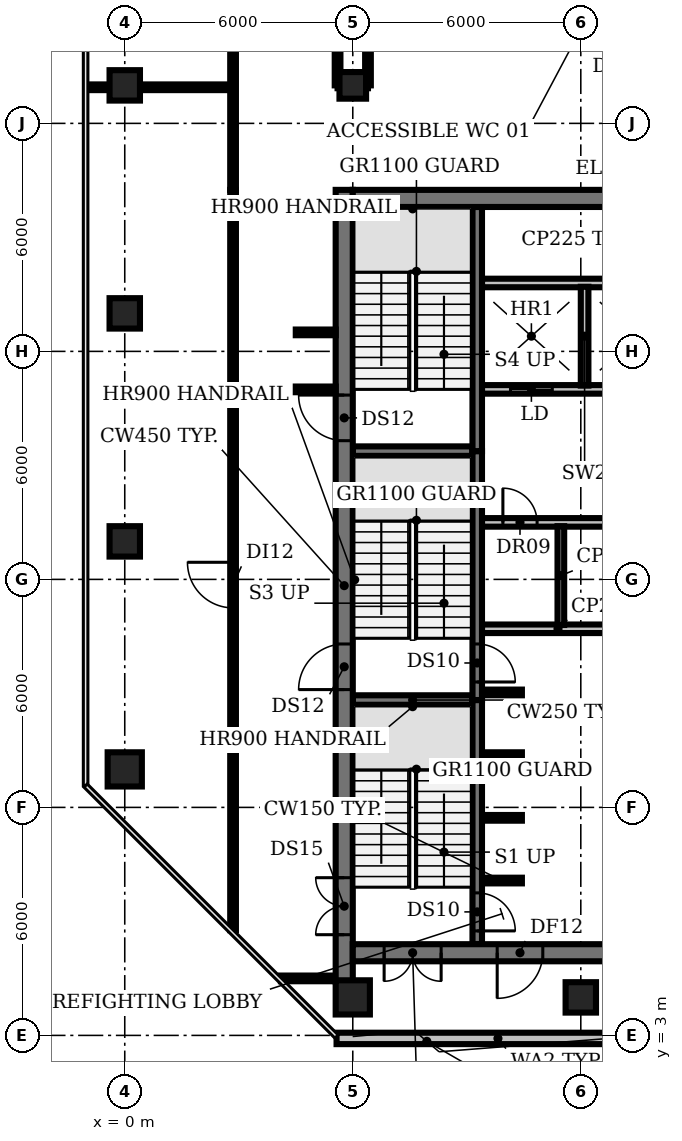
"""IFC4 building model, lengths in metres.
Left out: names, types, materials, properties, quantities, classifications, styles, units other than length and angle.
Written with IfcOpenShell. Run it as: python <this file> out.ifc"""

import sys

from ifc_helpers import new_model, si_unit, direction, frame, frame_2d, origin, origin_2d, place, context, subcontext, project, spatial, rectangle, circle, extrude, element, fill, save


model = new_model("IFC4")
c1 = context("Model", 3, precision=1e-05, world=origin(), true_north=direction((0.0, 1.0)))
c2 = subcontext(c1, "Body", "Model", "MODEL_VIEW")
j1 = project(units=[si_unit("LENGTHUNIT", "METRE"), si_unit("PLANEANGLEUNIT", "RADIAN")], contexts=[c1])
p1 = place(None, origin())
s1 = spatial("IfcSite", under=j1, at=p1, CompositionType="ELEMENT")
p2 = place(p1, origin())
s2 = spatial("IfcBuilding", under=s1, at=p2, CompositionType="ELEMENT")
p3 = place(p2, frame((0.0, 0.0, 209.6)))
s3 = spatial("IfcBuildingStorey", under=s2, at=p3, CompositionType="ELEMENT", Elevation=209.6)
p4 = place(p3, frame((0.0, 10.0, 0.0), z_axis=(0.0, 0.0, 1.0), x_axis=(1.0, 0.0, 0.0)))
e1 = element("IfcColumn", 1, at=p4, inside=s3, PredefinedType="COLUMN", context=c2, shape_type="SweptSolid", body=[
    extrude(circle(Radius=0.45, at=origin_2d()), origin(), (0.0, 0.0, 1.0), 3.8),
])
for number, where, z_axis, x_axis in (
    (2, (0.0, 16.0, 0.0), (0.0, 0.0, 1.0), (1.0, 0.0, 0.0)),
    (3, (0.0, 22.0, 0.0), (0.0, 0.0, 1.0), (1.0, 0.0, 0.0)),
    (4, (0.0, 28.0, 0.0), (0.0, 0.0, 1.0), (1.0, 0.0, 0.0)),
):
    element("IfcColumn", number, at=place(p3, frame(where, z_axis=z_axis, x_axis=x_axis)), inside=s3, PredefinedType="COLUMN", context=c2, shape_type="SweptSolid", body=[
        extrude(rectangle(XDim=0.8, YDim=0.8, at=origin_2d()), origin(), (0.0, 0.0, 1.0), 3.8),
    ])
p5 = place(p3, frame((6.0, 4.0, 0.0), z_axis=(0.0, 0.0, 1.0), x_axis=(1.0, 0.0, 0.0)))
e5 = element("IfcColumn", 5, at=p5, inside=s3, PredefinedType="COLUMN", context=c2, shape_type="SweptSolid", body=[
    extrude(circle(Radius=0.45, at=origin_2d()), origin(), (0.0, 0.0, 1.0), 3.8),
])
p6 = place(p3, frame((6.0, 28.0, 0.0), z_axis=(0.0, 0.0, 1.0), x_axis=(1.0, 0.0, 0.0)))
e6 = element("IfcColumn", 6, at=p6, inside=s3, PredefinedType="COLUMN", context=c2, shape_type="SweptSolid", body=[
    extrude(rectangle(XDim=0.7, YDim=0.7, at=origin_2d()), origin(), (0.0, 0.0, 1.0), 3.8),
])
p7 = place(p3, frame((12.0, 4.0, 0.0), z_axis=(0.0, 0.0, 1.0), x_axis=(1.0, 0.0, 0.0)))
e7 = element("IfcColumn", 7, at=p7, inside=s3, PredefinedType="COLUMN", context=c2, shape_type="SweptSolid", body=[
    extrude(rectangle(XDim=0.8, YDim=0.8, at=origin_2d()), origin(), (0.0, 0.0, 1.0), 3.8),
])
p8 = place(p3, frame((5.573, 2.92, 0.0), z_axis=(0.0, 0.0, 1.0), x_axis=(1.0, 0.0, 0.0)))
e8 = element("IfcWall", 8, at=p8, inside=s3, PredefinedType="SOLIDWALL", context=c2, shape_type="SweptSolid", body=[
    extrude(rectangle(XDim=8.492, YDim=0.3, at=frame_2d((4.246, 0.0))), origin(), (0.0, 0.0, 1.0), 3.8),
])
for number, where, z_axis, x_axis in (
    (9, (9.4, 7.075, 0.0), (0.0, 0.0, 1.0), (1.0, 0.0, 0.0)),
    (10, (9.4, 8.725, 0.0), (0.0, 0.0, 1.0), (1.0, 0.0, 0.0)),
    (11, (9.4, 10.375, 0.0), (0.0, 0.0, 1.0), (1.0, 0.0, 0.0)),
):
    element("IfcWall", number, at=place(p3, frame(where, z_axis=z_axis, x_axis=x_axis)), inside=s3, PredefinedType="SHEAR", context=c2, shape_type="SweptSolid", body=[
        extrude(rectangle(XDim=1.05, YDim=0.15, at=frame_2d((0.525, 0.0))), origin(), (0.0, 0.0, 1.0), 3.8),
    ])
p9 = place(p3, frame((6.0, 11.825, 0.0), z_axis=(0.0, 0.0, 1.0), x_axis=(1.0, 0.0, 0.0)))
e12 = element("IfcWall", 12, at=p9, inside=s3, PredefinedType="SHEAR", context=c2, shape_type="SweptSolid", body=[
    extrude(rectangle(XDim=3.15, YDim=0.25, at=frame_2d((1.575, 0.0))), origin(), (0.0, 0.0, 1.0), 3.8),
])
p10 = place(p3, frame((9.4, 12.025, 0.0), z_axis=(0.0, 0.0, 1.0), x_axis=(1.0, 0.0, 0.0)))
e13 = element("IfcWall", 13, at=p10, inside=s3, PredefinedType="SHEAR", context=c2, shape_type="SweptSolid", body=[
    extrude(rectangle(XDim=1.05, YDim=0.15, at=frame_2d((0.525, 0.0))), origin(), (0.0, 0.0, 1.0), 3.8),
])
p11 = place(p3, frame((9.4, 13.7, 0.0), z_axis=(0.0, 0.0, 1.0), x_axis=(1.0, 0.0, 0.0)))
e14 = element("IfcWall", 14, at=p11, inside=s3, PredefinedType="PARTITIONING", context=c2, shape_type="SweptSolid", body=[
    extrude(rectangle(XDim=4.0, YDim=0.225, at=frame_2d((2.0, 0.0))), origin(), (0.0, 0.0, 1.0), 3.8),
])
p12 = place(p3, frame((9.4, 16.5, 0.0), z_axis=(0.0, 0.0, 1.0), x_axis=(1.0, 0.0, 0.0)))
e15 = element("IfcWall", 15, at=p12, inside=s3, PredefinedType="PARTITIONING", context=c2, shape_type="SweptSolid", body=[
    extrude(rectangle(XDim=14.6, YDim=0.225, at=frame_2d((7.3, 0.0))), origin(), (0.0, 0.0, 1.0), 3.8),
])
p13 = place(p12, frame((0.55, 0.0, 0.0)))
e16 = element("IfcOpeningElement", 16, at=p13, cuts=e15, PredefinedType="OPENING", context=c2, shape_type="SweptSolid", body=[
    extrude(rectangle(XDim=0.9, YDim=2.1, at=frame_2d((0.45, 1.05))), frame((0.0, 0.123, 0.0), z_axis=(0.0, -1.0, 0.0), x_axis=(1.0, 0.0, 0.0)), (0.0, 0.0, 1.0), 0.245),
])
p14 = place(p12, frame((6.075, 0.0, 0.0)))
e17 = element("IfcOpeningElement", 17, at=p14, cuts=e15, PredefinedType="OPENING", context=c2, shape_type="SweptSolid", body=[
    extrude(rectangle(XDim=1.0, YDim=2.1, at=frame_2d((0.5, 1.05))), frame((0.0, 0.123, 0.0), z_axis=(0.0, -1.0, 0.0), x_axis=(1.0, 0.0, 0.0)), (0.0, 0.0, 1.0), 0.245),
])
p15 = place(p12, frame((11.647, 0.0, 0.0)))
e18 = element("IfcOpeningElement", 18, at=p15, cuts=e15, PredefinedType="OPENING", context=c2, shape_type="SweptSolid", body=[
    extrude(rectangle(XDim=0.9, YDim=2.1, at=frame_2d((0.45, 1.05))), frame((0.0, 0.123, 0.0), z_axis=(0.0, -1.0, 0.0), x_axis=(1.0, 0.0, 0.0)), (0.0, 0.0, 1.0), 0.245),
])
p16 = place(p12, frame((13.423, 0.0, 0.0)))
e19 = element("IfcOpeningElement", 19, at=p16, cuts=e15, PredefinedType="OPENING", context=c2, shape_type="SweptSolid", body=[
    extrude(rectangle(XDim=0.9, YDim=2.1, at=frame_2d((0.45, 1.05))), frame((0.0, 0.123, 0.0), z_axis=(0.0, -1.0, 0.0), x_axis=(1.0, 0.0, 0.0)), (0.0, 0.0, 1.0), 0.245),
])
p17 = place(p3, frame((6.0, 18.375, 0.0), z_axis=(0.0, 0.0, 1.0), x_axis=(1.0, 0.0, 0.0)))
e20 = element("IfcWall", 20, at=p17, inside=s3, PredefinedType="SHEAR", context=c2, shape_type="SweptSolid", body=[
    extrude(rectangle(XDim=3.15, YDim=0.25, at=frame_2d((1.575, 0.0))), origin(), (0.0, 0.0, 1.0), 3.8),
])
p18 = place(p3, frame((24.0, 20.0, 0.0), z_axis=(0.0, 0.0, 1.0), x_axis=(-1.0, 0.0, 0.0)))
e21 = element("IfcWall", 21, at=p18, inside=s3, PredefinedType="PARTITIONING", context=c2, shape_type="SweptSolid", body=[
    extrude(rectangle(XDim=14.6, YDim=0.225, at=frame_2d((7.3, 0.0))), origin(), (0.0, 0.0, 1.0), 3.8),
])
p19 = place(p18, frame((12.75, 0.0, 0.0)))
e22 = element("IfcOpeningElement", 22, at=p19, cuts=e21, PredefinedType="OPENING", context=c2, shape_type="SweptSolid", body=[
    extrude(rectangle(XDim=1.1, YDim=2.1, at=frame_2d((0.55, 1.05))), frame((0.0, 0.123, 0.0), z_axis=(0.0, -1.0, 0.0), x_axis=(1.0, 0.0, 0.0)), (0.0, 0.0, 1.0), 0.245),
])
p20 = place(p18, frame((9.95, 0.0, 0.0)))
e23 = element("IfcOpeningElement", 23, at=p20, cuts=e21, PredefinedType="OPENING", context=c2, shape_type="SweptSolid", body=[
    extrude(rectangle(XDim=1.1, YDim=2.1, at=frame_2d((0.55, 1.05))), frame((0.0, 0.123, 0.0), z_axis=(0.0, -1.0, 0.0), x_axis=(1.0, 0.0, 0.0)), (0.0, 0.0, 1.0), 0.245),
])
p21 = place(p18, frame((7.15, 0.0, 0.0)))
e24 = element("IfcOpeningElement", 24, at=p21, cuts=e21, PredefinedType="OPENING", context=c2, shape_type="SweptSolid", body=[
    extrude(rectangle(XDim=1.1, YDim=2.1, at=frame_2d((0.55, 1.05))), frame((0.0, 0.123, 0.0), z_axis=(0.0, -1.0, 0.0), x_axis=(1.0, 0.0, 0.0)), (0.0, 0.0, 1.0), 0.245),
])
p22 = place(p18, frame((4.35, 0.0, 0.0)))
e25 = element("IfcOpeningElement", 25, at=p22, cuts=e21, PredefinedType="OPENING", context=c2, shape_type="SweptSolid", body=[
    extrude(rectangle(XDim=1.1, YDim=2.1, at=frame_2d((0.55, 1.05))), frame((0.0, 0.123, 0.0), z_axis=(0.0, -1.0, 0.0), x_axis=(1.0, 0.0, 0.0)), (0.0, 0.0, 1.0), 0.245),
])
p23 = place(p18, frame((2.137, 0.0, 0.0)))
e26 = element("IfcOpeningElement", 26, at=p23, cuts=e21, PredefinedType="OPENING", context=c2, shape_type="SweptSolid", body=[
    extrude(rectangle(XDim=0.9, YDim=2.1, at=frame_2d((0.45, 1.05))), frame((0.0, 0.123, 0.0), z_axis=(0.0, -1.0, 0.0), x_axis=(1.0, 0.0, 0.0)), (0.0, 0.0, 1.0), 0.245),
])
p24 = place(p18, frame((0.363, 0.0, 0.0)))
e27 = element("IfcOpeningElement", 27, at=p24, cuts=e21, PredefinedType="OPENING", context=c2, shape_type="SweptSolid", body=[
    extrude(rectangle(XDim=0.9, YDim=2.1, at=frame_2d((0.45, 1.05))), frame((0.0, 0.123, 0.0), z_axis=(0.0, -1.0, 0.0), x_axis=(1.0, 0.0, 0.0)), (0.0, 0.0, 1.0), 0.245),
])
p25 = place(p3, frame((9.4, 22.8, 0.0), z_axis=(0.0, 0.0, 1.0), x_axis=(1.0, 0.0, 0.0)))
e28 = element("IfcWall", 28, at=p25, inside=s3, PredefinedType="PARTITIONING", context=c2, shape_type="SweptSolid", body=[
    extrude(rectangle(XDim=14.6, YDim=0.225, at=frame_2d((7.3, 0.0))), origin(), (0.0, 0.0, 1.0), 3.8),
])
p26 = place(p3, frame((9.275, 11.825, 0.0), z_axis=(0.0, 0.0, 1.0), x_axis=(0.0, -1.0, 0.0)))
e29 = element("IfcWall", 29, at=p26, inside=s3, PredefinedType="SHEAR", context=c2, shape_type="SweptSolid", body=[
    extrude(rectangle(XDim=6.425, YDim=0.25, at=frame_2d((3.212, 0.0))), origin(), (0.0, 0.0, 1.0), 3.8),
])
p27 = place(p26, frame((5.075, 0.0, 0.0)))
e30 = element("IfcOpeningElement", 30, at=p27, cuts=e29, PredefinedType="OPENING", context=c2, shape_type="SweptSolid", body=[
    extrude(rectangle(XDim=1.0, YDim=2.1, at=frame_2d((0.5, 1.05))), frame((0.0, 0.135, 0.0), z_axis=(0.0, -1.0, 0.0), x_axis=(1.0, 0.0, 0.0)), (0.0, 0.0, 1.0), 0.27),
])
p28 = place(p3, frame((9.275, 18.375, 0.0), z_axis=(0.0, 0.0, 1.0), x_axis=(0.0, -1.0, 0.0)))
e31 = element("IfcWall", 31, at=p28, inside=s3, PredefinedType="SHEAR", context=c2, shape_type="SweptSolid", body=[
    extrude(rectangle(XDim=6.55, YDim=0.25, at=frame_2d((3.275, 0.0))), origin(), (0.0, 0.0, 1.0), 3.8),
])
p29 = place(p28, frame((5.075, 0.0, 0.0)))
e32 = element("IfcOpeningElement", 32, at=p29, cuts=e31, PredefinedType="OPENING", context=c2, shape_type="SweptSolid", body=[
    extrude(rectangle(XDim=1.0, YDim=2.1, at=frame_2d((0.5, 1.05))), frame((0.0, 0.135, 0.0), z_axis=(0.0, -1.0, 0.0), x_axis=(1.0, 0.0, 0.0)), (0.0, 0.0, 1.0), 0.27),
])
p30 = place(p3, frame((9.275, 18.375, 0.0), z_axis=(0.0, 0.0, 1.0), x_axis=(0.0, 1.0, 0.0)))
e33 = element("IfcWall", 33, at=p30, inside=s3, PredefinedType="SHEAR", context=c2, shape_type="SweptSolid", body=[
    extrude(rectangle(XDim=6.425, YDim=0.25, at=frame_2d((3.212, 0.0))), origin(), (0.0, 0.0, 1.0), 3.8),
])
p31 = place(p3, frame((11.475, 13.8, 0.0), z_axis=(0.0, 0.0, 1.0), x_axis=(0.0, 1.0, 0.0)))
e34 = element("IfcWall", 34, at=p31, inside=s3, PredefinedType="PARTITIONING", context=c2, shape_type="SweptSolid", body=[
    extrude(rectangle(XDim=2.6, YDim=0.175, at=frame_2d((1.3, 0.0))), origin(), (0.0, 0.0, 1.0), 3.8),
])
p32 = place(p3, frame((12.1, 20.1, 0.0), z_axis=(0.0, 0.0, 1.0), x_axis=(0.0, 1.0, 0.0)))
e35 = element("IfcWall", 35, at=p32, inside=s3, PredefinedType="SOLIDWALL", context=c2, shape_type="SweptSolid", body=[
    extrude(rectangle(XDim=2.6, YDim=0.2, at=frame_2d((1.3, 0.0))), origin(), (0.0, 0.0, 1.0), 3.8),
])
p33 = place(p3, frame((5.775, 4.42, 0.0), z_axis=(0.0, 0.0, 1.0), x_axis=(0.0, 1.0, 0.0)))
e36 = element("IfcWall", 36, at=p33, inside=s3, PredefinedType="SHEAR", context=c2, shape_type="SweptSolid", body=[
    extrude(rectangle(XDim=20.83, YDim=0.45, at=frame_2d((10.415, 0.0))), origin(), (0.0, 0.0, 1.0), 3.8),
])
p34 = place(p33, frame((1.23, 0.0, 0.0)))
e37 = element("IfcOpeningElement", 37, at=p34, cuts=e36, PredefinedType="OPENING", context=c2, shape_type="SweptSolid", body=[
    extrude(rectangle(XDim=1.5, YDim=2.1, at=frame_2d((0.75, 1.05))), frame((0.0, 0.235, 0.0), z_axis=(0.0, -1.0, 0.0), x_axis=(1.0, 0.0, 0.0)), (0.0, 0.0, 1.0), 0.47),
])
p35 = place(p33, frame((7.68, 0.0, 0.0)))
e38 = element("IfcOpeningElement", 38, at=p35, cuts=e36, PredefinedType="OPENING", context=c2, shape_type="SweptSolid", body=[
    extrude(rectangle(XDim=1.2, YDim=2.1, at=frame_2d((0.6, 1.05))), frame((0.0, 0.235, 0.0), z_axis=(0.0, -1.0, 0.0), x_axis=(1.0, 0.0, 0.0)), (0.0, 0.0, 1.0), 0.47),
])
p36 = place(p33, frame((14.23, 0.0, 0.0)))
e39 = element("IfcOpeningElement", 39, at=p36, cuts=e36, PredefinedType="OPENING", context=c2, shape_type="SweptSolid", body=[
    extrude(rectangle(XDim=1.2, YDim=2.1, at=frame_2d((0.6, 1.05))), frame((0.0, 0.235, 0.0), z_axis=(0.0, -1.0, 0.0), x_axis=(1.0, 0.0, 0.0)), (0.0, 0.0, 1.0), 0.47),
])
p37 = place(p3, frame((24.0, 5.175, 0.0), z_axis=(0.0, 0.0, 1.0), x_axis=(-1.0, 0.0, 0.0)))
e40 = element("IfcWall", 40, at=p37, inside=s3, PredefinedType="SHEAR", context=c2, shape_type="SweptSolid", body=[
    extrude(rectangle(XDim=18.0, YDim=0.45, at=frame_2d((9.0, 0.0))), origin(), (0.0, 0.0, 1.0), 3.8),
])
p38 = place(p37, frame((0.825, 0.0, 0.0)))
e41 = element("IfcOpeningElement", 41, at=p38, cuts=e40, PredefinedType="OPENING", context=c2, shape_type="SweptSolid", body=[
    extrude(rectangle(XDim=1.5, YDim=2.1, at=frame_2d((0.75, 1.05))), frame((0.0, 0.235, 0.0), z_axis=(0.0, -1.0, 0.0), x_axis=(1.0, 0.0, 0.0)), (0.0, 0.0, 1.0), 0.47),
])
p39 = place(p37, frame((15.675, 0.0, 0.0)))
e42 = element("IfcOpeningElement", 42, at=p39, cuts=e40, PredefinedType="OPENING", context=c2, shape_type="SweptSolid", body=[
    extrude(rectangle(XDim=1.5, YDim=2.1, at=frame_2d((0.75, 1.05))), frame((0.0, 0.235, 0.0), z_axis=(0.0, -1.0, 0.0), x_axis=(1.0, 0.0, 0.0)), (0.0, 0.0, 1.0), 0.47),
])
p40 = place(p37, frame((13.0, 0.0, 0.0)))
e43 = element("IfcOpeningElement", 43, at=p40, cuts=e40, PredefinedType="OPENING", context=c2, shape_type="SweptSolid", body=[
    extrude(rectangle(XDim=1.2, YDim=2.1, at=frame_2d((0.6, 1.05))), frame((0.0, 0.235, 0.0), z_axis=(0.0, -1.0, 0.0), x_axis=(1.0, 0.0, 0.0)), (0.0, 0.0, 1.0), 0.47),
])
p41 = place(p37, frame((4.4, 0.0, 0.0)))
e44 = element("IfcOpeningElement", 44, at=p41, cuts=e40, PredefinedType="OPENING", context=c2, shape_type="SweptSolid", body=[
    extrude(rectangle(XDim=1.0, YDim=2.1, at=frame_2d((0.5, 1.05))), frame((0.0, 0.235, 0.0), z_axis=(0.0, -1.0, 0.0), x_axis=(1.0, 0.0, 0.0)), (0.0, 0.0, 1.0), 0.47),
])
p42 = place(p3, frame((6.0, 25.025, 0.0), z_axis=(0.0, 0.0, 1.0), x_axis=(1.0, 0.0, 0.0)))
e45 = element("IfcWall", 45, at=p42, inside=s3, PredefinedType="SHEAR", context=c2, shape_type="SweptSolid", body=[
    extrude(rectangle(XDim=18.0, YDim=0.45, at=frame_2d((9.0, 0.0))), origin(), (0.0, 0.0, 1.0), 3.8),
])
p43 = place(p3, frame((-0.98, 27.95, 0.0), z_axis=(0.0, 0.0, 1.0), x_axis=(1.0, 0.0, 0.0)))
e46 = element("IfcWall", 46, at=p43, inside=s3, PredefinedType="PARTITIONING", context=c2, shape_type="SweptSolid", body=[
    extrude(rectangle(XDim=3.83, YDim=0.15, at=frame_2d((1.915, 0.0))), origin(), (0.0, 0.0, 1.0), 2.83),
])
p44 = place(p3, frame((2.85, 5.77, 0.0), z_axis=(0.0, 0.0, 1.0), x_axis=(0.0, 1.0, 0.0)))
e47 = element("IfcWall", 47, at=p44, inside=s3, PredefinedType="PARTITIONING", context=c2, shape_type="SweptSolid", body=[
    extrude(rectangle(XDim=19.48, YDim=0.15, at=frame_2d((9.74, 0.0))), origin(), (0.0, 0.0, 1.0), 2.83),
])
p45 = place(p44, frame((8.48, 0.0, 0.0)))
e48 = element("IfcOpeningElement", 48, at=p45, cuts=e47, PredefinedType="OPENING", context=c2, shape_type="SweptSolid", body=[
    extrude(rectangle(XDim=1.2, YDim=2.1, at=frame_2d((0.6, 1.05))), frame((0.0, 0.085, 0.0), z_axis=(0.0, -1.0, 0.0), x_axis=(1.0, 0.0, 0.0)), (0.0, 0.0, 1.0), 0.17),
])
p46 = place(p3, frame((2.85, 25.25, 0.0), z_axis=(0.0, 0.0, 1.0), x_axis=(0.0, 1.0, 0.0)))
e49 = element("IfcWall", 49, at=p46, inside=s3, PredefinedType="PARTITIONING", context=c2, shape_type="SweptSolid", body=[
    extrude(rectangle(XDim=3.9, YDim=0.15, at=frame_2d((1.95, 0.0))), origin(), (0.0, 0.0, 1.0), 2.83),
])
p47 = place(p3, frame((4.11, 4.5, 0.0), z_axis=(0.0, 0.0, 1.0), x_axis=(1.0, 0.0, 0.0)))
e50 = element("IfcWall", 50, at=p47, inside=s3, PredefinedType="PARTITIONING", context=c2, shape_type="SweptSolid", body=[
    extrude(rectangle(XDim=1.34, YDim=0.15, at=frame_2d((0.67, 0.0))), origin(), (0.0, 0.0, 1.0), 2.83),
])
for number, where, z_axis, x_axis in (
    (51, (4.5, 20.0, 0.0), (0.0, 0.0, 1.0), (1.0, 0.0, 0.0)),
    (52, (4.5, 21.5, 0.0), (0.0, 0.0, 1.0), (1.0, 0.0, 0.0)),
):
    element("IfcWall", number, at=place(p3, frame(where, z_axis=z_axis, x_axis=x_axis)), inside=s3, PredefinedType="PARTITIONING", context=c2, shape_type="SweptSolid", body=[
        extrude(rectangle(XDim=1.05, YDim=0.15, at=frame_2d((0.525, 0.0))), origin(), (0.0, 0.0, 1.0), 2.83),
    ])
p48 = place(p3, frame((5.6, 28.0, 0.0), z_axis=(0.0, 0.0, 1.0), x_axis=(0.0, 1.0, 0.0)))
e53 = element("IfcWall", 53, at=p48, inside=s3, PredefinedType="PARTITIONING", context=c2, shape_type="SweptSolid", body=[
    extrude(rectangle(XDim=1.15, YDim=0.15, at=frame_2d((0.575, 0.0))), origin(), (0.0, 0.0, 1.0), 2.83),
])
p49 = place(p3, frame((5.6, 28.0, 0.0), z_axis=(0.0, 0.0, 1.0), x_axis=(1.0, 0.0, 0.0)))
e54 = element("IfcWall", 54, at=p49, inside=s3, PredefinedType="PARTITIONING", context=c2, shape_type="SweptSolid", body=[
    extrude(rectangle(XDim=0.8, YDim=0.15, at=frame_2d((0.4, 0.0))), origin(), (0.0, 0.0, 1.0), 2.83),
])
p50 = place(p3, frame((6.4, 28.0, 0.0), z_axis=(0.0, 0.0, 1.0), x_axis=(0.0, 1.0, 0.0)))
e55 = element("IfcWall", 55, at=p50, inside=s3, PredefinedType="PARTITIONING", context=c2, shape_type="SweptSolid", body=[
    extrude(rectangle(XDim=1.15, YDim=0.15, at=frame_2d((0.575, 0.0))), origin(), (0.0, 0.0, 1.0), 2.83),
])
p51 = place(p13, origin())
e56 = element("IfcDoor", 56, at=p51, inside=s3, OperationType="SINGLE_SWING_LEFT", PredefinedType="DOOR", context=c2, shape_type="SweptSolid", body=[
    extrude(rectangle(XDim=0.9, YDim=2.1, at=frame_2d((0.45, 1.05))), frame((0.0, 0.025, 0.0), z_axis=(0.0, -1.0, 0.0), x_axis=(1.0, 0.0, 0.0)), (0.0, 0.0, 1.0), 0.05),
])
fill(e16, e56)
p52 = place(p19, origin())
e57 = element("IfcDoor", 57, at=p52, inside=s3, OperationType="DOUBLE_DOOR_SLIDING", PredefinedType="DOOR", context=c2, shape_type="SweptSolid", body=[
    extrude(rectangle(XDim=1.1, YDim=2.1, at=frame_2d((0.55, 1.05))), frame((0.0, 0.025, 0.0), z_axis=(0.0, -1.0, 0.0), x_axis=(1.0, 0.0, 0.0)), (0.0, 0.0, 1.0), 0.05),
])
fill(e22, e57)
p53 = place(p27, origin())
e58 = element("IfcDoor", 58, at=p53, inside=s3, OperationType="SINGLE_SWING_RIGHT", PredefinedType="DOOR", context=c2, shape_type="SweptSolid", body=[
    extrude(rectangle(XDim=1.0, YDim=2.1, at=frame_2d((0.5, 1.05))), frame((0.0, 0.025, 0.0), z_axis=(0.0, -1.0, 0.0), x_axis=(1.0, 0.0, 0.0)), (0.0, 0.0, 1.0), 0.05),
])
fill(e30, e58)
p54 = place(p29, origin())
e59 = element("IfcDoor", 59, at=p54, inside=s3, OperationType="SINGLE_SWING_RIGHT", PredefinedType="DOOR", context=c2, shape_type="SweptSolid", body=[
    extrude(rectangle(XDim=1.0, YDim=2.1, at=frame_2d((0.5, 1.05))), frame((0.0, 0.025, 0.0), z_axis=(0.0, -1.0, 0.0), x_axis=(1.0, 0.0, 0.0)), (0.0, 0.0, 1.0), 0.05),
])
fill(e32, e59)
p55 = place(p34, origin())
e60 = element("IfcDoor", 60, at=p55, inside=s3, OperationType="DOUBLE_DOOR_SINGLE_SWING", PredefinedType="DOOR", context=c2, shape_type="SweptSolid", body=[
    extrude(rectangle(XDim=1.5, YDim=2.1, at=frame_2d((0.75, 1.05))), frame((0.0, 0.025, 0.0), z_axis=(0.0, -1.0, 0.0), x_axis=(1.0, 0.0, 0.0)), (0.0, 0.0, 1.0), 0.05),
])
fill(e37, e60)
p56 = place(p35, origin())
e61 = element("IfcDoor", 61, at=p56, inside=s3, OperationType="SINGLE_SWING_LEFT", PredefinedType="DOOR", context=c2, shape_type="SweptSolid", body=[
    extrude(rectangle(XDim=1.2, YDim=2.1, at=frame_2d((0.6, 1.05))), frame((0.0, 0.025, 0.0), z_axis=(0.0, -1.0, 0.0), x_axis=(1.0, 0.0, 0.0)), (0.0, 0.0, 1.0), 0.05),
])
fill(e38, e61)
p57 = place(p36, origin())
e62 = element("IfcDoor", 62, at=p57, inside=s3, OperationType="SINGLE_SWING_RIGHT", PredefinedType="DOOR", context=c2, shape_type="SweptSolid", body=[
    extrude(rectangle(XDim=1.2, YDim=2.1, at=frame_2d((0.6, 1.05))), frame((0.0, 0.025, 0.0), z_axis=(0.0, -1.0, 0.0), x_axis=(1.0, 0.0, 0.0)), (0.0, 0.0, 1.0), 0.05),
])
fill(e39, e62)
p58 = place(p39, origin())
e63 = element("IfcDoor", 63, at=p58, inside=s3, OperationType="DOUBLE_DOOR_SINGLE_SWING", PredefinedType="DOOR", context=c2, shape_type="SweptSolid", body=[
    extrude(rectangle(XDim=1.5, YDim=2.1, at=frame_2d((0.75, 1.05))), frame((0.0, 0.025, 0.0), z_axis=(0.0, -1.0, 0.0), x_axis=(1.0, 0.0, 0.0)), (0.0, 0.0, 1.0), 0.05),
])
fill(e42, e63)
p59 = place(p40, origin())
e64 = element("IfcDoor", 64, at=p59, inside=s3, OperationType="SINGLE_SWING_RIGHT", PredefinedType="DOOR", context=c2, shape_type="SweptSolid", body=[
    extrude(rectangle(XDim=1.2, YDim=2.1, at=frame_2d((0.6, 1.05))), frame((0.0, 0.025, 0.0), z_axis=(0.0, -1.0, 0.0), x_axis=(1.0, 0.0, 0.0)), (0.0, 0.0, 1.0), 0.05),
])
fill(e43, e64)
p60 = place(p45, origin())
e65 = element("IfcDoor", 65, at=p60, inside=s3, OperationType="SINGLE_SWING_RIGHT", PredefinedType="DOOR", context=c2, shape_type="SweptSolid", body=[
    extrude(rectangle(XDim=1.2, YDim=2.1, at=frame_2d((0.6, 1.05))), frame((0.0, 0.025, 0.0), z_axis=(0.0, -1.0, 0.0), x_axis=(1.0, 0.0, 0.0)), (0.0, 0.0, 1.0), 0.05),
])
fill(e48, e65)
save(model, sys.argv[1])
